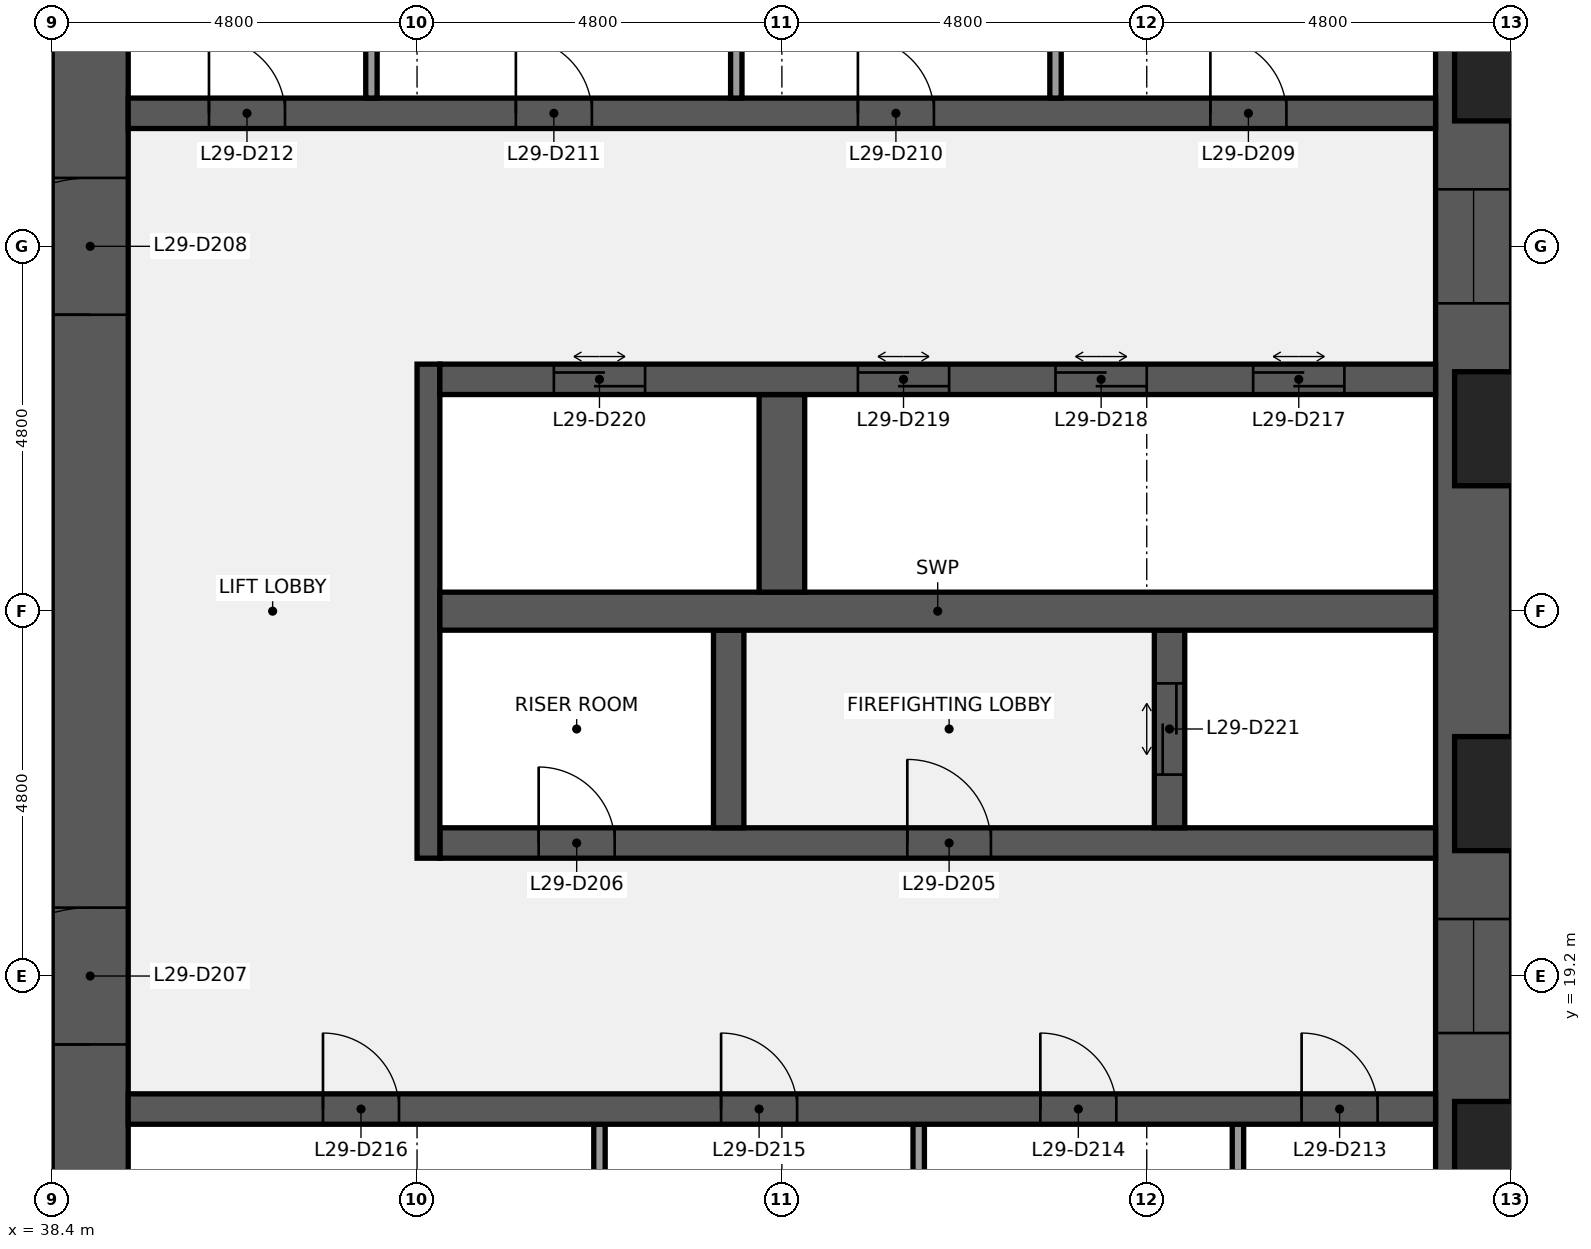
"""IFC4 building model, lengths in metres.
Left out: names, types, materials, properties, quantities, classifications, styles, units other than length and angle.
Written with IfcOpenShell. Run it as: python <this file> out.ifc"""

import sys

from ifc_helpers import new_model, si_unit, direction, frame, frame_2d, origin, place, context, subcontext, project, spatial, rectangle, extrude, element, fill, save


model = new_model("IFC4")
c1 = context("Model", 3, precision=1e-05, world=origin(), true_north=direction((0.0, 1.0)))
c2 = subcontext(c1, "Body", "Model", "MODEL_VIEW")
j1 = project(units=[si_unit("LENGTHUNIT", "METRE"), si_unit("PLANEANGLEUNIT", "RADIAN")], contexts=[c1])
p1 = place(None, origin())
s1 = spatial("IfcSite", under=j1, at=p1, CompositionType="ELEMENT")
p2 = place(p1, origin())
s2 = spatial("IfcBuilding", under=s1, at=p2, CompositionType="ELEMENT")
p3 = place(p2, frame((0.0, 0.0, 136.1)))
s3 = spatial("IfcBuildingStorey", under=s2, at=p3, CompositionType="ELEMENT", Elevation=136.1)
p4 = place(p3, frame((57.1, 38.4, 0.0), z_axis=(0.0, 0.0, 1.0), x_axis=(0.0, -1.0, 0.0)))
e1 = element("IfcWall", 1, at=p4, inside=s3, PredefinedType="SHEAR", context=c2, shape_type="SweptSolid", body=[
    extrude(rectangle(XDim=28.8, YDim=1.0, at=frame_2d((14.4, 0.0))), origin(), (0.0, 0.0, 1.0), 3.84),
])
p5 = place(p4, frame((18.45, 0.0, 0.9)))
e2 = element("IfcOpeningElement", 2, at=p5, cuts=e1, PredefinedType="OPENING", context=c2, shape_type="SweptSolid", body=[
    extrude(rectangle(XDim=1.5, YDim=1.5, at=frame_2d((0.75, 0.75))), frame((0.0, 0.51, 0.0), z_axis=(0.0, -1.0, 0.0), x_axis=(1.0, 0.0, 0.0)), (0.0, 0.0, 1.0), 1.02),
])
p6 = place(p4, frame((8.85, 0.0, 0.9)))
e3 = element("IfcOpeningElement", 3, at=p6, cuts=e1, PredefinedType="OPENING", context=c2, shape_type="SweptSolid", body=[
    extrude(rectangle(XDim=1.5, YDim=1.5, at=frame_2d((0.75, 0.75))), frame((0.0, 0.51, 0.0), z_axis=(0.0, -1.0, 0.0), x_axis=(1.0, 0.0, 0.0)), (0.0, 0.0, 1.0), 1.02),
])
p7 = place(p3, frame((38.9, 9.6, 0.0), z_axis=(0.0, 0.0, 1.0), x_axis=(0.0, 1.0, 0.0)))
e4 = element("IfcWall", 4, at=p7, inside=s3, PredefinedType="SHEAR", context=c2, shape_type="SweptSolid", body=[
    extrude(rectangle(XDim=28.8, YDim=1.0, at=frame_2d((14.4, 0.0))), origin(), (0.0, 0.0, 1.0), 3.84),
])
p8 = place(p7, frame((8.7, 0.0, 0.0)))
e5 = element("IfcOpeningElement", 5, at=p8, cuts=e4, PredefinedType="OPENING", context=c2, shape_type="SweptSolid", body=[
    extrude(rectangle(XDim=1.8, YDim=2.1, at=frame_2d((0.9, 1.05))), frame((0.0, 0.51, 0.0), z_axis=(0.0, -1.0, 0.0), x_axis=(1.0, 0.0, 0.0)), (0.0, 0.0, 1.0), 1.02),
])
p9 = place(p7, frame((18.3, 0.0, 0.0)))
e6 = element("IfcOpeningElement", 6, at=p9, cuts=e4, PredefinedType="OPENING", context=c2, shape_type="SweptSolid", body=[
    extrude(rectangle(XDim=1.8, YDim=2.1, at=frame_2d((0.9, 1.05))), frame((0.0, 0.51, 0.0), z_axis=(0.0, -1.0, 0.0), x_axis=(1.0, 0.0, 0.0)), (0.0, 0.0, 1.0), 1.02),
])
for number, where, z_axis, x_axis in (
    (7, (54.0, 14.65, 0.0), (0.0, 0.0, 1.0), (0.0, 1.0, 0.0)),
    (8, (49.8, 14.65, 0.0), (0.0, 0.0, 1.0), (0.0, 1.0, 0.0)),
    (9, (45.6, 14.65, 0.0), (0.0, 0.0, 1.0), (0.0, 1.0, 0.0)),
):
    element("IfcWall", number, at=place(p3, frame(where, z_axis=z_axis, x_axis=x_axis)), inside=s3, PredefinedType="PARTITIONING", context=c2, shape_type="SweptSolid", body=[
        extrude(rectangle(XDim=2.6, YDim=0.15, at=frame_2d((1.3, 0.0))), origin(), (0.0, 0.0, 1.0), 3.84),
    ])
p10 = place(p3, frame((39.4, 17.45, 0.0), z_axis=(0.0, 0.0, 1.0), x_axis=(1.0, 0.0, 0.0)))
e10 = element("IfcWall", 10, at=p10, inside=s3, PredefinedType="SHEAR", context=c2, shape_type="SweptSolid", body=[
    extrude(rectangle(XDim=17.2, YDim=0.4, at=frame_2d((8.6, 0.0))), origin(), (0.0, 0.0, 1.0), 3.84),
])
p11 = place(p10, frame((15.438, 0.0, 0.0)))
e11 = element("IfcOpeningElement", 11, at=p11, cuts=e10, PredefinedType="OPENING", context=c2, shape_type="SweptSolid", body=[
    extrude(rectangle(XDim=1.0, YDim=2.1, at=frame_2d((0.5, 1.05))), frame((0.0, 0.21, 0.0), z_axis=(0.0, -1.0, 0.0), x_axis=(1.0, 0.0, 0.0)), (0.0, 0.0, 1.0), 0.42),
])
p12 = place(p10, frame((12.0, 0.0, 0.0)))
e12 = element("IfcOpeningElement", 12, at=p12, cuts=e10, PredefinedType="OPENING", context=c2, shape_type="SweptSolid", body=[
    extrude(rectangle(XDim=1.0, YDim=2.1, at=frame_2d((0.5, 1.05))), frame((0.0, 0.21, 0.0), z_axis=(0.0, -1.0, 0.0), x_axis=(1.0, 0.0, 0.0)), (0.0, 0.0, 1.0), 0.42),
])
p13 = place(p10, frame((7.8, 0.0, 0.0)))
e13 = element("IfcOpeningElement", 13, at=p13, cuts=e10, PredefinedType="OPENING", context=c2, shape_type="SweptSolid", body=[
    extrude(rectangle(XDim=1.0, YDim=2.1, at=frame_2d((0.5, 1.05))), frame((0.0, 0.21, 0.0), z_axis=(0.0, -1.0, 0.0), x_axis=(1.0, 0.0, 0.0)), (0.0, 0.0, 1.0), 0.42),
])
p14 = place(p10, frame((2.562, 0.0, 0.0)))
e14 = element("IfcOpeningElement", 14, at=p14, cuts=e10, PredefinedType="OPENING", context=c2, shape_type="SweptSolid", body=[
    extrude(rectangle(XDim=1.0, YDim=2.1, at=frame_2d((0.5, 1.05))), frame((0.0, 0.21, 0.0), z_axis=(0.0, -1.0, 0.0), x_axis=(1.0, 0.0, 0.0)), (0.0, 0.0, 1.0), 0.42),
])
p15 = place(p3, frame((43.5, 20.95, 0.0), z_axis=(0.0, 0.0, 1.0), x_axis=(1.0, 0.0, 0.0)))
e15 = element("IfcWall", 15, at=p15, inside=s3, PredefinedType="SHEAR", context=c2, shape_type="SweptSolid", body=[
    extrude(rectangle(XDim=13.1, YDim=0.4, at=frame_2d((6.55, 0.0))), origin(), (0.0, 0.0, 1.0), 3.84),
])
p16 = place(p15, frame((6.15, 0.0, 0.0)))
e16 = element("IfcOpeningElement", 16, at=p16, cuts=e15, PredefinedType="OPENING", context=c2, shape_type="SweptSolid", body=[
    extrude(rectangle(XDim=1.1, YDim=2.1, at=frame_2d((0.55, 1.05))), frame((0.0, 0.21, 0.0), z_axis=(0.0, -1.0, 0.0), x_axis=(1.0, 0.0, 0.0)), (0.0, 0.0, 1.0), 0.42),
])
p17 = place(p15, frame((1.3, 0.0, 0.0)))
e17 = element("IfcOpeningElement", 17, at=p17, cuts=e15, PredefinedType="OPENING", context=c2, shape_type="SweptSolid", body=[
    extrude(rectangle(XDim=1.0, YDim=2.1, at=frame_2d((0.5, 1.05))), frame((0.0, 0.21, 0.0), z_axis=(0.0, -1.0, 0.0), x_axis=(1.0, 0.0, 0.0)), (0.0, 0.0, 1.0), 0.42),
])
p18 = place(p3, frame((43.35, 20.75, 0.0), z_axis=(0.0, 0.0, 1.0), x_axis=(0.0, 1.0, 0.0)))
e18 = element("IfcWall", 18, at=p18, inside=s3, PredefinedType="SHEAR", context=c2, shape_type="SweptSolid", body=[
    extrude(rectangle(XDim=6.5, YDim=0.3, at=frame_2d((3.25, 0.0))), origin(), (0.0, 0.0, 1.0), 3.84),
])
p19 = place(p3, frame((53.1, 21.15, 0.0), z_axis=(0.0, 0.0, 1.0), x_axis=(0.0, 1.0, 0.0)))
e19 = element("IfcWall", 19, at=p19, inside=s3, PredefinedType="SHEAR", context=c2, shape_type="SweptSolid", body=[
    extrude(rectangle(XDim=2.6, YDim=0.4, at=frame_2d((1.3, 0.0))), origin(), (0.0, 0.0, 1.0), 3.84),
])
p20 = place(p19, frame((0.7, 0.0, 0.0)))
e20 = element("IfcOpeningElement", 20, at=p20, cuts=e19, PredefinedType="OPENING", context=c2, shape_type="SweptSolid", body=[
    extrude(rectangle(XDim=1.2, YDim=2.1, at=frame_2d((0.6, 1.05))), frame((0.0, 0.21, 0.0), z_axis=(0.0, -1.0, 0.0), x_axis=(1.0, 0.0, 0.0)), (0.0, 0.0, 1.0), 0.42),
])
p21 = place(p3, frame((47.3, 21.15, 0.0), z_axis=(0.0, 0.0, 1.0), x_axis=(0.0, 1.0, 0.0)))
e21 = element("IfcWall", 21, at=p21, inside=s3, PredefinedType="SHEAR", context=c2, shape_type="SweptSolid", body=[
    extrude(rectangle(XDim=2.6, YDim=0.4, at=frame_2d((1.3, 0.0))), origin(), (0.0, 0.0, 1.0), 3.84),
])
p22 = place(p3, frame((43.5, 24.0, 0.0), z_axis=(0.0, 0.0, 1.0), x_axis=(1.0, 0.0, 0.0)))
e22 = element("IfcWall", 22, at=p22, inside=s3, PredefinedType="SHEAR", context=c2, shape_type="SweptSolid", body=[
    extrude(rectangle(XDim=13.1, YDim=0.5, at=frame_2d((6.55, 0.0))), origin(), (0.0, 0.0, 1.0), 3.84),
])
p23 = place(p3, frame((48.0, 24.25, 0.0), z_axis=(0.0, 0.0, 1.0), x_axis=(0.0, 1.0, 0.0)))
e23 = element("IfcWall", 23, at=p23, inside=s3, PredefinedType="SHEAR", context=c2, shape_type="SweptSolid", body=[
    extrude(rectangle(XDim=2.6, YDim=0.6, at=frame_2d((1.3, 0.0))), origin(), (0.0, 0.0, 1.0), 3.84),
])
p24 = place(p3, frame((43.5, 27.05, 0.0), z_axis=(0.0, 0.0, 1.0), x_axis=(1.0, 0.0, 0.0)))
e24 = element("IfcWall", 24, at=p24, inside=s3, PredefinedType="SHEAR", context=c2, shape_type="SweptSolid", body=[
    extrude(rectangle(XDim=13.1, YDim=0.4, at=frame_2d((6.55, 0.0))), origin(), (0.0, 0.0, 1.0), 3.84),
])
p25 = place(p24, frame((10.7, 0.0, 0.0)))
e25 = element("IfcOpeningElement", 25, at=p25, cuts=e24, PredefinedType="OPENING", context=c2, shape_type="SweptSolid", body=[
    extrude(rectangle(XDim=1.2, YDim=2.1, at=frame_2d((0.6, 1.05))), frame((0.0, 0.21, 0.0), z_axis=(0.0, -1.0, 0.0), x_axis=(1.0, 0.0, 0.0)), (0.0, 0.0, 1.0), 0.42),
])
p26 = place(p24, frame((8.1, 0.0, 0.0)))
e26 = element("IfcOpeningElement", 26, at=p26, cuts=e24, PredefinedType="OPENING", context=c2, shape_type="SweptSolid", body=[
    extrude(rectangle(XDim=1.2, YDim=2.1, at=frame_2d((0.6, 1.05))), frame((0.0, 0.21, 0.0), z_axis=(0.0, -1.0, 0.0), x_axis=(1.0, 0.0, 0.0)), (0.0, 0.0, 1.0), 0.42),
])
p27 = place(p24, frame((5.5, 0.0, 0.0)))
e27 = element("IfcOpeningElement", 27, at=p27, cuts=e24, PredefinedType="OPENING", context=c2, shape_type="SweptSolid", body=[
    extrude(rectangle(XDim=1.2, YDim=2.1, at=frame_2d((0.6, 1.05))), frame((0.0, 0.21, 0.0), z_axis=(0.0, -1.0, 0.0), x_axis=(1.0, 0.0, 0.0)), (0.0, 0.0, 1.0), 0.42),
])
p28 = place(p24, frame((1.5, 0.0, 0.0)))
e28 = element("IfcOpeningElement", 28, at=p28, cuts=e24, PredefinedType="OPENING", context=c2, shape_type="SweptSolid", body=[
    extrude(rectangle(XDim=1.2, YDim=2.1, at=frame_2d((0.6, 1.05))), frame((0.0, 0.21, 0.0), z_axis=(0.0, -1.0, 0.0), x_axis=(1.0, 0.0, 0.0)), (0.0, 0.0, 1.0), 0.42),
])
p29 = place(p3, frame((39.4, 30.55, 0.0), z_axis=(0.0, 0.0, 1.0), x_axis=(1.0, 0.0, 0.0)))
e29 = element("IfcWall", 29, at=p29, inside=s3, PredefinedType="SHEAR", context=c2, shape_type="SweptSolid", body=[
    extrude(rectangle(XDim=17.2, YDim=0.4, at=frame_2d((8.6, 0.0))), origin(), (0.0, 0.0, 1.0), 3.84),
])
p30 = place(p29, frame((14.238, 0.0, 0.0)))
e30 = element("IfcOpeningElement", 30, at=p30, cuts=e29, PredefinedType="OPENING", context=c2, shape_type="SweptSolid", body=[
    extrude(rectangle(XDim=1.0, YDim=2.1, at=frame_2d((0.5, 1.05))), frame((0.0, 0.21, 0.0), z_axis=(0.0, -1.0, 0.0), x_axis=(1.0, 0.0, 0.0)), (0.0, 0.0, 1.0), 0.42),
])
p31 = place(p29, frame((9.6, 0.0, 0.0)))
e31 = element("IfcOpeningElement", 31, at=p31, cuts=e29, PredefinedType="OPENING", context=c2, shape_type="SweptSolid", body=[
    extrude(rectangle(XDim=1.0, YDim=2.1, at=frame_2d((0.5, 1.05))), frame((0.0, 0.21, 0.0), z_axis=(0.0, -1.0, 0.0), x_axis=(1.0, 0.0, 0.0)), (0.0, 0.0, 1.0), 0.42),
])
p32 = place(p29, frame((5.1, 0.0, 0.0)))
e32 = element("IfcOpeningElement", 32, at=p32, cuts=e29, PredefinedType="OPENING", context=c2, shape_type="SweptSolid", body=[
    extrude(rectangle(XDim=1.0, YDim=2.1, at=frame_2d((0.5, 1.05))), frame((0.0, 0.21, 0.0), z_axis=(0.0, -1.0, 0.0), x_axis=(1.0, 0.0, 0.0)), (0.0, 0.0, 1.0), 0.42),
])
p33 = place(p29, frame((1.062, 0.0, 0.0)))
e33 = element("IfcOpeningElement", 33, at=p33, cuts=e29, PredefinedType="OPENING", context=c2, shape_type="SweptSolid", body=[
    extrude(rectangle(XDim=1.0, YDim=2.1, at=frame_2d((0.5, 1.05))), frame((0.0, 0.21, 0.0), z_axis=(0.0, -1.0, 0.0), x_axis=(1.0, 0.0, 0.0)), (0.0, 0.0, 1.0), 0.42),
])
for number, where, z_axis, x_axis in (
    (34, (51.6, 30.75, 0.0), (0.0, 0.0, 1.0), (0.0, 1.0, 0.0)),
    (35, (47.4, 30.75, 0.0), (0.0, 0.0, 1.0), (0.0, 1.0, 0.0)),
    (36, (42.6, 30.75, 0.0), (0.0, 0.0, 1.0), (0.0, 1.0, 0.0)),
):
    element("IfcWall", number, at=place(p3, frame(where, z_axis=z_axis, x_axis=x_axis)), inside=s3, PredefinedType="PARTITIONING", context=c2, shape_type="SweptSolid", body=[
        extrude(rectangle(XDim=2.6, YDim=0.15, at=frame_2d((1.3, 0.0))), origin(), (0.0, 0.0, 1.0), 3.84),
    ])
p34 = place(p16, origin())
e37 = element("IfcDoor", 37, at=p34, inside=s3, OperationType="SINGLE_SWING_LEFT", PredefinedType="DOOR", context=c2, shape_type="SweptSolid", body=[
    extrude(rectangle(XDim=1.1, YDim=2.1, at=frame_2d((0.55, 1.05))), frame((0.0, 0.025, 0.0), z_axis=(0.0, -1.0, 0.0), x_axis=(1.0, 0.0, 0.0)), (0.0, 0.0, 1.0), 0.05),
])
fill(e16, e37)
p35 = place(p17, origin())
e38 = element("IfcDoor", 38, at=p35, inside=s3, OperationType="SINGLE_SWING_LEFT", PredefinedType="DOOR", context=c2, shape_type="SweptSolid", body=[
    extrude(rectangle(XDim=1.0, YDim=2.1, at=frame_2d((0.5, 1.05))), frame((0.0, 0.025, 0.0), z_axis=(0.0, -1.0, 0.0), x_axis=(1.0, 0.0, 0.0)), (0.0, 0.0, 1.0), 0.05),
])
fill(e17, e38)
p36 = place(p8, origin())
e39 = element("IfcDoor", 39, at=p36, inside=s3, OperationType="DOUBLE_DOOR_SINGLE_SWING", PredefinedType="DOOR", context=c2, shape_type="SweptSolid", body=[
    extrude(rectangle(XDim=1.8, YDim=2.1, at=frame_2d((0.9, 1.05))), frame((0.0, 0.025, 0.0), z_axis=(0.0, -1.0, 0.0), x_axis=(1.0, 0.0, 0.0)), (0.0, 0.0, 1.0), 0.05),
])
fill(e5, e39)
p37 = place(p9, origin())
e40 = element("IfcDoor", 40, at=p37, inside=s3, OperationType="DOUBLE_DOOR_SINGLE_SWING", PredefinedType="DOOR", context=c2, shape_type="SweptSolid", body=[
    extrude(rectangle(XDim=1.8, YDim=2.1, at=frame_2d((0.9, 1.05))), frame((0.0, 0.025, 0.0), z_axis=(0.0, -1.0, 0.0), x_axis=(1.0, 0.0, 0.0)), (0.0, 0.0, 1.0), 0.05),
])
fill(e6, e40)
p38 = place(p30, origin())
e41 = element("IfcDoor", 41, at=p38, inside=s3, OperationType="SINGLE_SWING_LEFT", PredefinedType="DOOR", context=c2, shape_type="SweptSolid", body=[
    extrude(rectangle(XDim=1.0, YDim=2.1, at=frame_2d((0.5, 1.05))), frame((0.0, 0.025, 0.0), z_axis=(0.0, -1.0, 0.0), x_axis=(1.0, 0.0, 0.0)), (0.0, 0.0, 1.0), 0.05),
])
fill(e30, e41)
p39 = place(p31, origin())
e42 = element("IfcDoor", 42, at=p39, inside=s3, OperationType="SINGLE_SWING_LEFT", PredefinedType="DOOR", context=c2, shape_type="SweptSolid", body=[
    extrude(rectangle(XDim=1.0, YDim=2.1, at=frame_2d((0.5, 1.05))), frame((0.0, 0.025, 0.0), z_axis=(0.0, -1.0, 0.0), x_axis=(1.0, 0.0, 0.0)), (0.0, 0.0, 1.0), 0.05),
])
fill(e31, e42)
p40 = place(p32, origin())
e43 = element("IfcDoor", 43, at=p40, inside=s3, OperationType="SINGLE_SWING_LEFT", PredefinedType="DOOR", context=c2, shape_type="SweptSolid", body=[
    extrude(rectangle(XDim=1.0, YDim=2.1, at=frame_2d((0.5, 1.05))), frame((0.0, 0.025, 0.0), z_axis=(0.0, -1.0, 0.0), x_axis=(1.0, 0.0, 0.0)), (0.0, 0.0, 1.0), 0.05),
])
fill(e32, e43)
p41 = place(p33, origin())
e44 = element("IfcDoor", 44, at=p41, inside=s3, OperationType="SINGLE_SWING_LEFT", PredefinedType="DOOR", context=c2, shape_type="SweptSolid", body=[
    extrude(rectangle(XDim=1.0, YDim=2.1, at=frame_2d((0.5, 1.05))), frame((0.0, 0.025, 0.0), z_axis=(0.0, -1.0, 0.0), x_axis=(1.0, 0.0, 0.0)), (0.0, 0.0, 1.0), 0.05),
])
fill(e33, e44)
p42 = place(p11, origin())
e45 = element("IfcDoor", 45, at=p42, inside=s3, OperationType="SINGLE_SWING_LEFT", PredefinedType="DOOR", context=c2, shape_type="SweptSolid", body=[
    extrude(rectangle(XDim=1.0, YDim=2.1, at=frame_2d((0.5, 1.05))), frame((0.0, 0.025, 0.0), z_axis=(0.0, -1.0, 0.0), x_axis=(1.0, 0.0, 0.0)), (0.0, 0.0, 1.0), 0.05),
])
fill(e11, e45)
p43 = place(p12, origin())
e46 = element("IfcDoor", 46, at=p43, inside=s3, OperationType="SINGLE_SWING_LEFT", PredefinedType="DOOR", context=c2, shape_type="SweptSolid", body=[
    extrude(rectangle(XDim=1.0, YDim=2.1, at=frame_2d((0.5, 1.05))), frame((0.0, 0.025, 0.0), z_axis=(0.0, -1.0, 0.0), x_axis=(1.0, 0.0, 0.0)), (0.0, 0.0, 1.0), 0.05),
])
fill(e12, e46)
p44 = place(p13, origin())
e47 = element("IfcDoor", 47, at=p44, inside=s3, OperationType="SINGLE_SWING_LEFT", PredefinedType="DOOR", context=c2, shape_type="SweptSolid", body=[
    extrude(rectangle(XDim=1.0, YDim=2.1, at=frame_2d((0.5, 1.05))), frame((0.0, 0.025, 0.0), z_axis=(0.0, -1.0, 0.0), x_axis=(1.0, 0.0, 0.0)), (0.0, 0.0, 1.0), 0.05),
])
fill(e13, e47)
p45 = place(p14, origin())
e48 = element("IfcDoor", 48, at=p45, inside=s3, OperationType="SINGLE_SWING_LEFT", PredefinedType="DOOR", context=c2, shape_type="SweptSolid", body=[
    extrude(rectangle(XDim=1.0, YDim=2.1, at=frame_2d((0.5, 1.05))), frame((0.0, 0.025, 0.0), z_axis=(0.0, -1.0, 0.0), x_axis=(1.0, 0.0, 0.0)), (0.0, 0.0, 1.0), 0.05),
])
fill(e14, e48)
p46 = place(p25, origin())
e49 = element("IfcDoor", 49, at=p46, inside=s3, OperationType="DOUBLE_DOOR_SLIDING", PredefinedType="DOOR", context=c2, shape_type="SweptSolid", body=[
    extrude(rectangle(XDim=1.2, YDim=2.1, at=frame_2d((0.6, 1.05))), frame((0.0, 0.025, 0.0), z_axis=(0.0, -1.0, 0.0), x_axis=(1.0, 0.0, 0.0)), (0.0, 0.0, 1.0), 0.05),
])
fill(e25, e49)
p47 = place(p26, origin())
e50 = element("IfcDoor", 50, at=p47, inside=s3, OperationType="DOUBLE_DOOR_SLIDING", PredefinedType="DOOR", context=c2, shape_type="SweptSolid", body=[
    extrude(rectangle(XDim=1.2, YDim=2.1, at=frame_2d((0.6, 1.05))), frame((0.0, 0.025, 0.0), z_axis=(0.0, -1.0, 0.0), x_axis=(1.0, 0.0, 0.0)), (0.0, 0.0, 1.0), 0.05),
])
fill(e26, e50)
p48 = place(p27, origin())
e51 = element("IfcDoor", 51, at=p48, inside=s3, OperationType="DOUBLE_DOOR_SLIDING", PredefinedType="DOOR", context=c2, shape_type="SweptSolid", body=[
    extrude(rectangle(XDim=1.2, YDim=2.1, at=frame_2d((0.6, 1.05))), frame((0.0, 0.025, 0.0), z_axis=(0.0, -1.0, 0.0), x_axis=(1.0, 0.0, 0.0)), (0.0, 0.0, 1.0), 0.05),
])
fill(e27, e51)
p49 = place(p28, origin())
e52 = element("IfcDoor", 52, at=p49, inside=s3, OperationType="DOUBLE_DOOR_SLIDING", PredefinedType="DOOR", context=c2, shape_type="SweptSolid", body=[
    extrude(rectangle(XDim=1.2, YDim=2.1, at=frame_2d((0.6, 1.05))), frame((0.0, 0.025, 0.0), z_axis=(0.0, -1.0, 0.0), x_axis=(1.0, 0.0, 0.0)), (0.0, 0.0, 1.0), 0.05),
])
fill(e28, e52)
p50 = place(p20, origin())
e53 = element("IfcDoor", 53, at=p50, inside=s3, OperationType="DOUBLE_DOOR_SLIDING", PredefinedType="DOOR", context=c2, shape_type="SweptSolid", body=[
    extrude(rectangle(XDim=1.2, YDim=2.1, at=frame_2d((0.6, 1.05))), frame((0.0, 0.025, 0.0), z_axis=(0.0, -1.0, 0.0), x_axis=(1.0, 0.0, 0.0)), (0.0, 0.0, 1.0), 0.05),
])
fill(e20, e53)
p51 = place(p5, origin())
e54 = element("IfcWindow", 54, at=p51, inside=s3, PartitioningType="SINGLE_PANEL", PredefinedType="WINDOW", context=c2, shape_type="SweptSolid", body=[
    extrude(rectangle(XDim=1.5, YDim=1.5, at=frame_2d((0.75, 0.75))), frame((0.0, 0.03, 0.0), z_axis=(0.0, -1.0, 0.0), x_axis=(1.0, 0.0, 0.0)), (0.0, 0.0, 1.0), 0.06),
])
fill(e2, e54)
p52 = place(p6, origin())
e55 = element("IfcWindow", 55, at=p52, inside=s3, PartitioningType="SINGLE_PANEL", PredefinedType="WINDOW", context=c2, shape_type="SweptSolid", body=[
    extrude(rectangle(XDim=1.5, YDim=1.5, at=frame_2d((0.75, 0.75))), frame((0.0, 0.03, 0.0), z_axis=(0.0, -1.0, 0.0), x_axis=(1.0, 0.0, 0.0)), (0.0, 0.0, 1.0), 0.06),
])
fill(e3, e55)
save(model, sys.argv[1])
